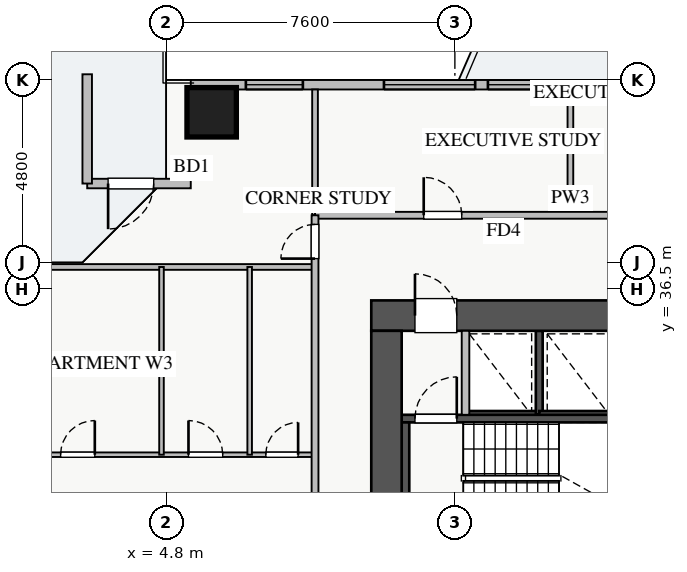
"""IFC4 building model, lengths in metres.
Left out: names, types, materials, properties, quantities, classifications, styles, units other than length and angle.
Written with IfcOpenShell. Run it as: python <this file> out.ifc"""

import sys

from ifc_helpers import new_model, si_unit, direction, frame, frame_2d, origin, origin_2d, place, context, subcontext, project, spatial, rectangle, extrude, source, transform, mapped, element, fill, save


model = new_model("IFC4")
c1 = context("Model", 3, precision=1e-05, world=origin(), true_north=direction((0.0, 1.0)))
c2 = subcontext(c1, "Body", "Model", "MODEL_VIEW")
j1 = project(units=[si_unit("LENGTHUNIT", "METRE"), si_unit("PLANEANGLEUNIT", "RADIAN")], contexts=[c1])
p1 = place(None, origin())
s1 = spatial("IfcSite", under=j1, at=p1, CompositionType="ELEMENT")
p2 = place(p1, origin())
s2 = spatial("IfcBuilding", under=s1, at=p2, CompositionType="ELEMENT")
p3 = place(p2, frame((0.0, 0.0, 42.5)))
s3 = spatial("IfcBuildingStorey", under=s2, at=p3, CompositionType="ELEMENT", Elevation=42.5)
p4 = place(p3, frame((12.68, 33.2, 0.0), z_axis=(0.0, 0.0, 1.0), x_axis=(1.0, 0.0, 0.0)))
e1 = element("IfcWall", 1, at=p4, inside=s3, PredefinedType="SHEAR", context=c2, shape_type="SweptSolid", body=[
    extrude(rectangle(XDim=1.94, YDim=0.18, at=frame_2d((0.97, 0.0))), origin(), (0.0, 0.0, 1.0), 3.03),
])
p5 = place(p3, frame((14.62, 33.2, 0.0), z_axis=(0.0, 0.0, 1.0), x_axis=(0.0, 1.0, 0.0)))
e2 = element("IfcWall", 2, at=p5, inside=s3, PredefinedType="SHEAR", context=c2, shape_type="SweptSolid", body=[
    extrude(rectangle(XDim=2.2, YDim=0.18, at=frame_2d((1.1, 0.0))), origin(), (0.0, 0.0, 1.0), 3.03),
])
p6 = place(p3, frame((14.62, 33.2, 0.0), z_axis=(0.0, 0.0, 1.0), x_axis=(1.0, 0.0, 0.0)))
e3 = element("IfcWall", 3, at=p6, inside=s3, PredefinedType="SHEAR", context=c2, shape_type="SweptSolid", body=[
    extrude(rectangle(XDim=1.96, YDim=0.18, at=frame_2d((0.98, 0.0))), origin(), (0.0, 0.0, 1.0), 3.03),
])
p7 = place(p3, frame((11.0, 33.09, 0.0), z_axis=(0.0, 0.0, 1.0), x_axis=(1.0, 0.0, 0.0)))
e4 = element("IfcWall", 4, at=p7, inside=s3, PredefinedType="SHEAR", context=c2, shape_type="SweptSolid", body=[
    extrude(rectangle(XDim=7.15, YDim=0.2, at=frame_2d((3.575, 0.0))), origin(), (0.0, 0.0, 1.0), 3.25),
])
p8 = place(p7, frame((0.35, 0.0, 0.0)))
e5 = element("IfcOpeningElement", 5, at=p8, cuts=e4, PredefinedType="OPENING", context=c2, shape_type="SweptSolid", body=[
    extrude(rectangle(XDim=1.1, YDim=2.05, at=frame_2d((0.55, 1.025))), frame((0.0, 0.11, 0.0), z_axis=(0.0, -1.0, 0.0), x_axis=(1.0, 0.0, 0.0)), (0.0, 0.0, 1.0), 0.22),
])
p9 = place(p3, frame((11.1, 30.05, 0.0), z_axis=(0.0, 0.0, 1.0), x_axis=(0.0, 1.0, 0.0)))
e6 = element("IfcWall", 6, at=p9, inside=s3, PredefinedType="SHEAR", context=c2, shape_type="SweptSolid", body=[
    extrude(rectangle(XDim=2.94, YDim=0.2, at=frame_2d((1.47, 0.0))), origin(), (0.0, 0.0, 1.0), 3.25),
])
p10 = place(p3, frame((10.2, 35.8, 0.0), z_axis=(0.0, 0.0, 1.0), x_axis=(1.0, 0.0, 0.0)))
e7 = element("IfcWall", 7, at=p10, inside=s3, PredefinedType="SHEAR", context=c2, shape_type="SweptSolid", body=[
    extrude(rectangle(XDim=17.6, YDim=0.8, at=frame_2d((8.8, 0.0))), origin(), (0.0, 0.0, 1.0), 3.25),
])
p11 = place(p10, frame((1.15, 0.0, 0.0)))
e8 = element("IfcOpeningElement", 8, at=p11, cuts=e7, PredefinedType="OPENING", context=c2, shape_type="SweptSolid", body=[
    extrude(rectangle(XDim=1.1, YDim=2.05, at=frame_2d((0.55, 1.025))), frame((0.0, 0.41, 0.0), z_axis=(0.0, -1.0, 0.0), x_axis=(1.0, 0.0, 0.0)), (0.0, 0.0, 1.0), 0.82),
])
p12 = place(p10, frame((8.3, 0.0, 0.0)))
e9 = element("IfcOpeningElement", 9, at=p12, cuts=e7, PredefinedType="OPENING", context=c2, shape_type="SweptSolid", body=[
    extrude(rectangle(XDim=1.1, YDim=2.05, at=frame_2d((0.55, 1.025))), frame((0.0, 0.41, 0.0), z_axis=(0.0, -1.0, 0.0), x_axis=(1.0, 0.0, 0.0)), (0.0, 0.0, 1.0), 0.82),
])
p13 = place(p10, frame((10.05, 0.0, 0.0)))
e10 = element("IfcOpeningElement", 10, at=p13, cuts=e7, PredefinedType="OPENING", context=c2, shape_type="SweptSolid", body=[
    extrude(rectangle(XDim=1.1, YDim=2.05, at=frame_2d((0.55, 1.025))), frame((0.0, 0.41, 0.0), z_axis=(0.0, -1.0, 0.0), x_axis=(1.0, 0.0, 0.0)), (0.0, 0.0, 1.0), 0.82),
])
p14 = place(p10, frame((14.74, 0.0, 0.0)))
e11 = element("IfcOpeningElement", 11, at=p14, cuts=e7, PredefinedType="OPENING", context=c2, shape_type="SweptSolid", body=[
    extrude(rectangle(XDim=1.0, YDim=2.05, at=frame_2d((0.5, 1.025))), frame((0.0, 0.41, 0.0), z_axis=(0.0, -1.0, 0.0), x_axis=(1.0, 0.0, 0.0)), (0.0, 0.0, 1.0), 0.82),
])
p15 = place(p10, frame((11.95, 0.0, 0.0)))
e12 = element("IfcOpeningElement", 12, at=p15, cuts=e7, PredefinedType="OPENING", context=c2, shape_type="SweptSolid", body=[
    extrude(rectangle(XDim=1.0, YDim=2.05, at=frame_2d((0.5, 1.025))), frame((0.0, 0.41, 0.0), z_axis=(0.0, -1.0, 0.0), x_axis=(1.0, 0.0, 0.0)), (0.0, 0.0, 1.0), 0.82),
])
p16 = place(p10, frame((13.485, 0.0, 0.0)))
e13 = element("IfcOpeningElement", 13, at=p16, cuts=e7, PredefinedType="OPENING", context=c2, shape_type="SweptSolid", body=[
    extrude(rectangle(XDim=1.0, YDim=2.05, at=frame_2d((0.5, 1.025))), frame((0.0, 0.41, 0.0), z_axis=(0.0, -1.0, 0.0), x_axis=(1.0, 0.0, 0.0)), (0.0, 0.0, 1.0), 0.82),
])
p17 = place(p3, frame((10.6, 29.8, 0.0), z_axis=(0.0, 0.0, 1.0), x_axis=(0.0, 1.0, 0.0)))
e14 = element("IfcWall", 14, at=p17, inside=s3, PredefinedType="SHEAR", context=c2, shape_type="SweptSolid", body=[
    extrude(rectangle(XDim=5.6, YDim=0.8, at=frame_2d((2.8, 0.0))), origin(), (0.0, 0.0, 1.0), 3.25),
])
m1 = source(origin(), c2, "Body", "SweptSolid", [
    extrude(rectangle(XDim=1.3, YDim=1.3, at=origin_2d()), origin(), (0.0, 0.0, 1.0), 3.25),
])
p18 = place(p3, frame((6.0, 41.15, 0.0), z_axis=(0.0, 0.0, 1.0), x_axis=(1.0, 0.0, 0.0)))
e15 = element("IfcColumn", 15, at=p18, inside=s3, PredefinedType="COLUMN", context=c2, shape_type="MappedRepresentation", body=[
    mapped(m1, transform((0.0, 0.0, 0.0), x_axis=(1.0, 0.0, 0.0), y_axis=(0.0, 1.0, 0.0), z_axis=(0.0, 0.0, 1.0), scale=1.0)),
])
p19 = place(p3, frame((5.45, 41.875, 0.0), z_axis=(0.0, 0.0, 1.0), x_axis=(1.0, 0.0, 0.0)))
e16 = element("IfcWall", 16, at=p19, inside=s3, PredefinedType="STANDARD", context=c2, shape_type="SweptSolid", body=[
    extrude(rectangle(XDim=27.1, YDim=0.25, at=frame_2d((13.55, 0.0))), origin(), (0.0, 0.0, 1.0), 2.57),
])
p20 = place(p19, frame((14.4, 0.0, 0.0)))
e17 = element("IfcOpeningElement", 17, at=p20, cuts=e16, PredefinedType="OPENING", context=c2, shape_type="SweptSolid", body=[
    extrude(rectangle(XDim=1.2, YDim=2.1, at=frame_2d((0.6, 1.05))), frame((0.0, 0.135, 0.0), z_axis=(0.0, -1.0, 0.0), x_axis=(1.0, 0.0, 0.0)), (0.0, 0.0, 1.0), 0.27),
])
p21 = place(p19, frame((1.45, 0.0, 0.9)))
e18 = element("IfcOpeningElement", 18, at=p21, cuts=e16, PredefinedType="OPENING", context=c2, shape_type="SweptSolid", body=[
    extrude(rectangle(XDim=1.5, YDim=1.5, at=frame_2d((0.75, 0.75))), frame((0.0, 0.135, 0.0), z_axis=(0.0, -1.0, 0.0), x_axis=(1.0, 0.0, 0.0)), (0.0, 0.0, 1.0), 0.27),
])
p22 = place(p19, frame((7.82, 0.0, 0.9)))
e19 = element("IfcOpeningElement", 19, at=p22, cuts=e16, PredefinedType="OPENING", context=c2, shape_type="SweptSolid", body=[
    extrude(rectangle(XDim=1.8, YDim=1.5, at=frame_2d((0.9, 0.75))), frame((0.0, 0.135, 0.0), z_axis=(0.0, -1.0, 0.0), x_axis=(1.0, 0.0, 0.0)), (0.0, 0.0, 1.0), 0.27),
])
p23 = place(p19, frame((17.92, 0.0, 0.9)))
e20 = element("IfcOpeningElement", 20, at=p23, cuts=e16, PredefinedType="OPENING", context=c2, shape_type="SweptSolid", body=[
    extrude(rectangle(XDim=1.5, YDim=1.5, at=frame_2d((0.75, 0.75))), frame((0.0, 0.135, 0.0), z_axis=(0.0, -1.0, 0.0), x_axis=(1.0, 0.0, 0.0)), (0.0, 0.0, 1.0), 0.27),
])
p24 = place(p19, frame((22.663, 0.0, 0.9)))
e21 = element("IfcOpeningElement", 21, at=p24, cuts=e16, PredefinedType="OPENING", context=c2, shape_type="SweptSolid", body=[
    extrude(rectangle(XDim=2.1, YDim=1.48, at=frame_2d((1.05, 0.74))), frame((0.0, 0.135, 0.0), z_axis=(0.0, -1.0, 0.0), x_axis=(1.0, 0.0, 0.0)), (0.0, 0.0, 1.0), 0.27),
])
p25 = place(p19, frame((5.084, 0.0, 0.9)))
e22 = element("IfcOpeningElement", 22, at=p25, cuts=e16, PredefinedType="OPENING", context=c2, shape_type="SweptSolid", body=[
    extrude(rectangle(XDim=2.4, YDim=1.5, at=frame_2d((1.2, 0.75))), frame((0.0, 0.135, 0.0), z_axis=(0.0, -1.0, 0.0), x_axis=(1.0, 0.0, 0.0)), (0.0, 0.0, 1.0), 0.27),
])
p26 = place(p19, frame((11.002, 0.0, 0.9)))
e23 = element("IfcOpeningElement", 23, at=p26, cuts=e16, PredefinedType="OPENING", context=c2, shape_type="SweptSolid", body=[
    extrude(rectangle(XDim=2.4, YDim=1.5, at=frame_2d((1.2, 0.75))), frame((0.0, 0.135, 0.0), z_axis=(0.0, -1.0, 0.0), x_axis=(1.0, 0.0, 0.0)), (0.0, 0.0, 1.0), 0.27),
])
p27 = place(p3, frame((2.725, 39.275, 0.0), z_axis=(0.0, 0.0, 1.0), x_axis=(1.0, 0.0, 0.0)))
e24 = element("IfcWall", 24, at=p27, inside=s3, PredefinedType="STANDARD", context=c2, shape_type="SweptSolid", body=[
    extrude(rectangle(XDim=2.725, YDim=0.25, at=frame_2d((1.362, 0.0))), origin(), (0.0, 0.0, 1.0), 2.57),
])
p28 = place(p27, frame((0.55, 0.0, 0.0)))
e25 = element("IfcOpeningElement", 25, at=p28, cuts=e24, PredefinedType="OPENING", context=c2, shape_type="SweptSolid", body=[
    extrude(rectangle(XDim=1.2, YDim=2.1, at=frame_2d((0.6, 1.05))), frame((0.0, 0.135, 0.0), z_axis=(0.0, -1.0, 0.0), x_axis=(1.0, 0.0, 0.0)), (0.0, 0.0, 1.0), 0.27),
])
p29 = place(p3, frame((2.725, 39.275, 0.0), z_axis=(0.0, 0.0, 1.0), x_axis=(0.0, 1.0, 0.0)))
e26 = element("IfcWall", 26, at=p29, inside=s3, PredefinedType="STANDARD", context=c2, shape_type="SweptSolid", body=[
    extrude(rectangle(XDim=2.875, YDim=0.25, at=frame_2d((1.438, 0.0))), origin(), (0.0, 0.0, 1.0), 2.57),
])
p30 = place(p3, frame((12.68, 33.19, 0.0), z_axis=(0.0, 0.0, 1.0), x_axis=(0.0, 1.0, 0.0)))
e27 = element("IfcWall", 27, at=p30, inside=s3, PredefinedType="PARTITIONING", context=c2, shape_type="SweptSolid", body=[
    extrude(rectangle(XDim=2.21, YDim=0.2, at=frame_2d((1.105, 0.0))), origin(), (0.0, 0.0, 1.0), 3.03),
])
for number, where, z_axis, x_axis in (
    (28, (15.44, 38.44, 0.0), (0.0, 0.0, 1.0), (0.0, 1.0, 0.0)),
    (29, (8.72, 38.44, 0.0), (0.0, 0.0, 1.0), (0.0, 1.0, 0.0)),
):
    element("IfcWall", number, at=place(p3, frame(where, z_axis=z_axis, x_axis=x_axis)), inside=s3, PredefinedType="PARTITIONING", context=c2, shape_type="SweptSolid", body=[
        extrude(rectangle(XDim=3.31, YDim=0.15, at=frame_2d((1.655, 0.0))), origin(), (0.0, 0.0, 1.0), 3.03),
    ])
p31 = place(p3, frame((8.72, 38.44, 0.0), z_axis=(0.0, 0.0, 1.0), x_axis=(1.0, 0.0, 0.0)))
e30 = element("IfcWall", 30, at=p31, inside=s3, PredefinedType="PARTITIONING", context=c2, shape_type="SweptSolid", body=[
    extrude(rectangle(XDim=23.63, YDim=0.18, at=frame_2d((11.815, 0.0))), origin(), (0.0, 0.0, 1.0), 3.03),
])
p32 = place(p31, frame((2.86, 0.0, 0.0)))
e31 = element("IfcOpeningElement", 31, at=p32, cuts=e30, PredefinedType="OPENING", context=c2, shape_type="SweptSolid", body=[
    extrude(rectangle(XDim=1.0, YDim=2.05, at=frame_2d((0.5, 1.025))), frame((0.0, 0.1, 0.0), z_axis=(0.0, -1.0, 0.0), x_axis=(1.0, 0.0, 0.0)), (0.0, 0.0, 1.0), 0.2),
])
p33 = place(p31, frame((9.4, 0.0, 0.0)))
e32 = element("IfcOpeningElement", 32, at=p33, cuts=e30, PredefinedType="OPENING", context=c2, shape_type="SweptSolid", body=[
    extrude(rectangle(XDim=1.0, YDim=2.05, at=frame_2d((0.5, 1.025))), frame((0.0, 0.1, 0.0), z_axis=(0.0, -1.0, 0.0), x_axis=(1.0, 0.0, 0.0)), (0.0, 0.0, 1.0), 0.2),
])
p34 = place(p31, frame((14.9, 0.0, 0.0)))
e33 = element("IfcOpeningElement", 33, at=p34, cuts=e30, PredefinedType="OPENING", context=c2, shape_type="SweptSolid", body=[
    extrude(rectangle(XDim=1.0, YDim=2.05, at=frame_2d((0.5, 1.025))), frame((0.0, 0.1, 0.0), z_axis=(0.0, -1.0, 0.0), x_axis=(1.0, 0.0, 0.0)), (0.0, 0.0, 1.0), 0.2),
])
p35 = place(p31, frame((20.175, 0.0, 0.0)))
e34 = element("IfcOpeningElement", 34, at=p35, cuts=e30, PredefinedType="OPENING", context=c2, shape_type="SweptSolid", body=[
    extrude(rectangle(XDim=1.0, YDim=2.05, at=frame_2d((0.5, 1.025))), frame((0.0, 0.1, 0.0), z_axis=(0.0, -1.0, 0.0), x_axis=(1.0, 0.0, 0.0)), (0.0, 0.0, 1.0), 0.2),
])
p36 = place(p3, frame((0.25, 37.08, 0.0), z_axis=(0.0, 0.0, 1.0), x_axis=(1.0, 0.0, 0.0)))
e35 = element("IfcWall", 35, at=p36, inside=s3, PredefinedType="PARTITIONING", context=c2, shape_type="SweptSolid", body=[
    extrude(rectangle(XDim=8.47, YDim=0.15, at=frame_2d((4.235, 0.0))), origin(), (0.0, 0.0, 1.0), 3.03),
])
p37 = place(p3, frame((0.25, 32.14, 0.0), z_axis=(0.0, 0.0, 1.0), x_axis=(1.0, 0.0, 0.0)))
e36 = element("IfcWall", 36, at=p37, inside=s3, PredefinedType="PLUMBINGWALL", context=c2, shape_type="SweptSolid", body=[
    extrude(rectangle(XDim=8.47, YDim=0.12, at=frame_2d((4.235, 0.0))), origin(), (0.0, 0.0, 1.0), 3.03),
])
p38 = place(p37, frame((1.775, 0.0, 0.0)))
e37 = element("IfcOpeningElement", 37, at=p38, cuts=e36, PredefinedType="OPENING", context=c2, shape_type="SweptSolid", body=[
    extrude(rectangle(XDim=0.9, YDim=2.05, at=frame_2d((0.45, 1.025))), frame((0.0, 0.07, 0.0), z_axis=(0.0, -1.0, 0.0), x_axis=(1.0, 0.0, 0.0)), (0.0, 0.0, 1.0), 0.14),
])
p39 = place(p37, frame((5.14, 0.0, 0.0)))
e38 = element("IfcOpeningElement", 38, at=p39, cuts=e36, PredefinedType="OPENING", context=c2, shape_type="SweptSolid", body=[
    extrude(rectangle(XDim=0.9, YDim=2.05, at=frame_2d((0.45, 1.025))), frame((0.0, 0.07, 0.0), z_axis=(0.0, -1.0, 0.0), x_axis=(1.0, 0.0, 0.0)), (0.0, 0.0, 1.0), 0.14),
])
p40 = place(p37, frame((7.175, 0.0, 0.0)))
e39 = element("IfcOpeningElement", 39, at=p40, cuts=e36, PredefinedType="OPENING", context=c2, shape_type="SweptSolid", body=[
    extrude(rectangle(XDim=0.85, YDim=2.05, at=frame_2d((0.425, 1.025))), frame((0.0, 0.07, 0.0), z_axis=(0.0, -1.0, 0.0), x_axis=(1.0, 0.0, 0.0)), (0.0, 0.0, 1.0), 0.14),
])
for number, where, z_axis, x_axis in (
    (40, (4.68, 32.14, 0.0), (0.0, 0.0, 1.0), (0.0, 1.0, 0.0)),
    (41, (7.0, 32.14, 0.0), (0.0, 0.0, 1.0), (0.0, 1.0, 0.0)),
):
    element("IfcWall", number, at=place(p3, frame(where, z_axis=z_axis, x_axis=x_axis)), inside=s3, PredefinedType="PLUMBINGWALL", context=c2, shape_type="SweptSolid", body=[
        extrude(rectangle(XDim=4.94, YDim=0.12, at=frame_2d((2.47, 0.0))), origin(), (0.0, 0.0, 1.0), 3.03),
    ])
p41 = place(p3, frame((8.72, 7.21, 0.0), z_axis=(0.0, 0.0, 1.0), x_axis=(0.0, 1.0, 0.0)))
e42 = element("IfcWall", 42, at=p41, inside=s3, PredefinedType="PARTITIONING", context=c2, shape_type="SweptSolid", body=[
    extrude(rectangle(XDim=31.23, YDim=0.18, at=frame_2d((15.615, 0.0))), origin(), (0.0, 0.0, 1.0), 3.03),
])
p42 = place(p41, frame((30.09, 0.0, 0.0)))
e43 = element("IfcOpeningElement", 43, at=p42, cuts=e42, PredefinedType="OPENING", context=c2, shape_type="SweptSolid", body=[
    extrude(rectangle(XDim=0.9, YDim=2.05, at=frame_2d((0.45, 1.025))), frame((0.0, 0.1, 0.0), z_axis=(0.0, -1.0, 0.0), x_axis=(1.0, 0.0, 0.0)), (0.0, 0.0, 1.0), 0.2),
])
p43 = place(p41, frame((0.24, 0.0, 0.0)))
e44 = element("IfcOpeningElement", 44, at=p43, cuts=e42, PredefinedType="OPENING", context=c2, shape_type="SweptSolid", body=[
    extrude(rectangle(XDim=0.9, YDim=2.05, at=frame_2d((0.45, 1.025))), frame((0.0, 0.1, 0.0), z_axis=(0.0, -1.0, 0.0), x_axis=(1.0, 0.0, 0.0)), (0.0, 0.0, 1.0), 0.2),
])
p44 = place(p41, frame((5.265, 0.0, 0.0)))
e45 = element("IfcOpeningElement", 45, at=p44, cuts=e42, PredefinedType="OPENING", context=c2, shape_type="SweptSolid", body=[
    extrude(rectangle(XDim=1.0, YDim=2.05, at=frame_2d((0.5, 1.025))), frame((0.0, 0.1, 0.0), z_axis=(0.0, -1.0, 0.0), x_axis=(1.0, 0.0, 0.0)), (0.0, 0.0, 1.0), 0.2),
])
p45 = place(p41, frame((11.93, 0.0, 0.0)))
e46 = element("IfcOpeningElement", 46, at=p45, cuts=e42, PredefinedType="OPENING", context=c2, shape_type="SweptSolid", body=[
    extrude(rectangle(XDim=1.0, YDim=2.05, at=frame_2d((0.5, 1.025))), frame((0.0, 0.1, 0.0), z_axis=(0.0, -1.0, 0.0), x_axis=(1.0, 0.0, 0.0)), (0.0, 0.0, 1.0), 0.2),
])
p46 = place(p41, frame((21.96, 0.0, 0.0)))
e47 = element("IfcOpeningElement", 47, at=p46, cuts=e42, PredefinedType="OPENING", context=c2, shape_type="SweptSolid", body=[
    extrude(rectangle(XDim=1.0, YDim=2.05, at=frame_2d((0.5, 1.025))), frame((0.0, 0.1, 0.0), z_axis=(0.0, -1.0, 0.0), x_axis=(1.0, 0.0, 0.0)), (0.0, 0.0, 1.0), 0.2),
])
m2 = source(origin(), c2, "Body", "SweptSolid", [
    extrude(rectangle(XDim=1.5, YDim=1.5, at=frame_2d((0.75, 0.75))), frame((0.0, 0.03, 0.0), z_axis=(0.0, -1.0, 0.0), x_axis=(1.0, 0.0, 0.0)), (0.0, 0.0, 1.0), 0.06),
])
p47 = place(p21, origin())
e48 = element("IfcWindow", 48, at=p47, inside=s3, PartitioningType="TRIPLE_PANEL_VERTICAL", PredefinedType="WINDOW", context=c2, shape_type="MappedRepresentation", body=[
    mapped(m2, transform((0.0, 0.0, 0.0), x_axis=(1.0, 0.0, 0.0), y_axis=(0.0, 1.0, 0.0), z_axis=(0.0, 0.0, 1.0), scale=1.0)),
])
fill(e18, e48)
m3 = source(origin(), c2, "Body", "SweptSolid", [
    extrude(rectangle(XDim=1.8, YDim=1.5, at=frame_2d((0.9, 0.75))), frame((0.0, 0.03, 0.0), z_axis=(0.0, -1.0, 0.0), x_axis=(1.0, 0.0, 0.0)), (0.0, 0.0, 1.0), 0.06),
])
p48 = place(p22, origin())
e49 = element("IfcWindow", 49, at=p48, inside=s3, PartitioningType="DOUBLE_PANEL_VERTICAL", PredefinedType="WINDOW", context=c2, shape_type="MappedRepresentation", body=[
    mapped(m3, transform((0.0, 0.0, 0.0), x_axis=(1.0, 0.0, 0.0), y_axis=(0.0, 1.0, 0.0), z_axis=(0.0, 0.0, 1.0), scale=1.0)),
])
fill(e19, e49)
m4 = source(origin(), c2, "Body", "SweptSolid", [
    extrude(rectangle(XDim=1.2, YDim=2.1, at=frame_2d((0.6, 1.05))), frame((0.0, 0.025, 0.0), z_axis=(0.0, -1.0, 0.0), x_axis=(1.0, 0.0, 0.0)), (0.0, 0.0, 1.0), 0.05),
])
p49 = place(p28, frame((1.2, 0.0, 0.0), z_axis=(0.0, 0.0, 1.0), x_axis=(-1.0, 0.0, 0.0)))
e50 = element("IfcDoor", 50, at=p49, inside=s3, OperationType="SINGLE_SWING_LEFT", PredefinedType="DOOR", context=c2, shape_type="MappedRepresentation", body=[
    mapped(m4, transform((0.0, 0.0, 0.0), x_axis=(1.0, 0.0, 0.0), y_axis=(0.0, 1.0, 0.0), z_axis=(0.0, 0.0, 1.0), scale=1.0)),
])
fill(e25, e50)
m5 = source(origin(), c2, "Body", "SweptSolid", [
    extrude(rectangle(XDim=1.1, YDim=2.05, at=frame_2d((0.55, 1.025))), frame((0.0, 0.025, 0.0), z_axis=(0.0, -1.0, 0.0), x_axis=(1.0, 0.0, 0.0)), (0.0, 0.0, 1.0), 0.05),
])
p50 = place(p11, origin())
e51 = element("IfcDoor", 51, at=p50, inside=s3, OperationType="SINGLE_SWING_LEFT", PredefinedType="DOOR", context=c2, shape_type="MappedRepresentation", body=[
    mapped(m5, transform((0.0, 0.0, 0.0), x_axis=(1.0, 0.0, 0.0), y_axis=(0.0, 1.0, 0.0), z_axis=(0.0, 0.0, 1.0), scale=1.0)),
])
fill(e8, e51)
p51 = place(p8, origin())
e52 = element("IfcDoor", 52, at=p51, inside=s3, OperationType="SINGLE_SWING_RIGHT", PredefinedType="DOOR", context=c2, shape_type="MappedRepresentation", body=[
    mapped(m5, transform((0.0, 0.0, 0.0), x_axis=(1.0, 0.0, 0.0), y_axis=(0.0, 1.0, 0.0), z_axis=(0.0, 0.0, 1.0), scale=1.0)),
])
fill(e5, e52)
m6 = source(origin(), c2, "Body", "SweptSolid", [
    extrude(rectangle(XDim=1.0, YDim=2.05, at=frame_2d((0.5, 1.025))), frame((0.0, 0.025, 0.0), z_axis=(0.0, -1.0, 0.0), x_axis=(1.0, 0.0, 0.0)), (0.0, 0.0, 1.0), 0.05),
])
p52 = place(p32, origin())
e53 = element("IfcDoor", 53, at=p52, inside=s3, OperationType="SINGLE_SWING_LEFT", PredefinedType="DOOR", context=c2, shape_type="MappedRepresentation", body=[
    mapped(m6, transform((0.0, 0.0, 0.0), x_axis=(1.0, 0.0, 0.0), y_axis=(0.0, 1.0, 0.0), z_axis=(0.0, 0.0, 1.0), scale=1.0)),
])
fill(e31, e53)
m7 = source(origin(), c2, "Body", "SweptSolid", [
    extrude(rectangle(XDim=0.9, YDim=2.05, at=frame_2d((0.45, 1.025))), frame((0.0, 0.025, 0.0), z_axis=(0.0, -1.0, 0.0), x_axis=(1.0, 0.0, 0.0)), (0.0, 0.0, 1.0), 0.05),
])
p53 = place(p38, origin())
e54 = element("IfcDoor", 54, at=p53, inside=s3, OperationType="SINGLE_SWING_RIGHT", PredefinedType="DOOR", context=c2, shape_type="MappedRepresentation", body=[
    mapped(m7, transform((0.0, 0.0, 0.0), x_axis=(1.0, 0.0, 0.0), y_axis=(0.0, 1.0, 0.0), z_axis=(0.0, 0.0, 1.0), scale=1.0)),
])
fill(e37, e54)
p54 = place(p39, origin())
e55 = element("IfcDoor", 55, at=p54, inside=s3, OperationType="SINGLE_SWING_LEFT", PredefinedType="DOOR", context=c2, shape_type="MappedRepresentation", body=[
    mapped(m7, transform((0.0, 0.0, 0.0), x_axis=(1.0, 0.0, 0.0), y_axis=(0.0, 1.0, 0.0), z_axis=(0.0, 0.0, 1.0), scale=1.0)),
])
fill(e38, e55)
m8 = source(origin(), c2, "Body", "SweptSolid", [
    extrude(rectangle(XDim=0.85, YDim=2.05, at=frame_2d((0.425, 1.025))), frame((0.0, 0.025, 0.0), z_axis=(0.0, -1.0, 0.0), x_axis=(1.0, 0.0, 0.0)), (0.0, 0.0, 1.0), 0.05),
])
p55 = place(p40, origin())
e56 = element("IfcDoor", 56, at=p55, inside=s3, OperationType="SINGLE_SWING_RIGHT", PredefinedType="DOOR", context=c2, shape_type="MappedRepresentation", body=[
    mapped(m8, transform((0.0, 0.0, 0.0), x_axis=(1.0, 0.0, 0.0), y_axis=(0.0, 1.0, 0.0), z_axis=(0.0, 0.0, 1.0), scale=1.0)),
])
fill(e39, e56)
p56 = place(p42, origin())
e57 = element("IfcDoor", 57, at=p56, inside=s3, OperationType="SINGLE_SWING_LEFT", PredefinedType="DOOR", context=c2, shape_type="MappedRepresentation", body=[
    mapped(m7, transform((0.0, 0.0, 0.0), x_axis=(1.0, 0.0, 0.0), y_axis=(0.0, 1.0, 0.0), z_axis=(0.0, 0.0, 1.0), scale=1.0)),
])
fill(e43, e57)
m9 = source(origin(), c2, "Body", "SweptSolid", [
    extrude(rectangle(XDim=2.4, YDim=1.5, at=frame_2d((1.2, 0.75))), frame((0.0, 0.03, 0.0), z_axis=(0.0, -1.0, 0.0), x_axis=(1.0, 0.0, 0.0)), (0.0, 0.0, 1.0), 0.06),
])
p57 = place(p25, origin())
e58 = element("IfcWindow", 58, at=p57, inside=s3, PartitioningType="TRIPLE_PANEL_VERTICAL", PredefinedType="WINDOW", context=c2, shape_type="MappedRepresentation", body=[
    mapped(m9, transform((0.0, 0.0, 0.0), x_axis=(1.0, 0.0, 0.0), y_axis=(0.0, 1.0, 0.0), z_axis=(0.0, 0.0, 1.0), scale=1.0)),
])
fill(e22, e58)
save(model, sys.argv[1])
